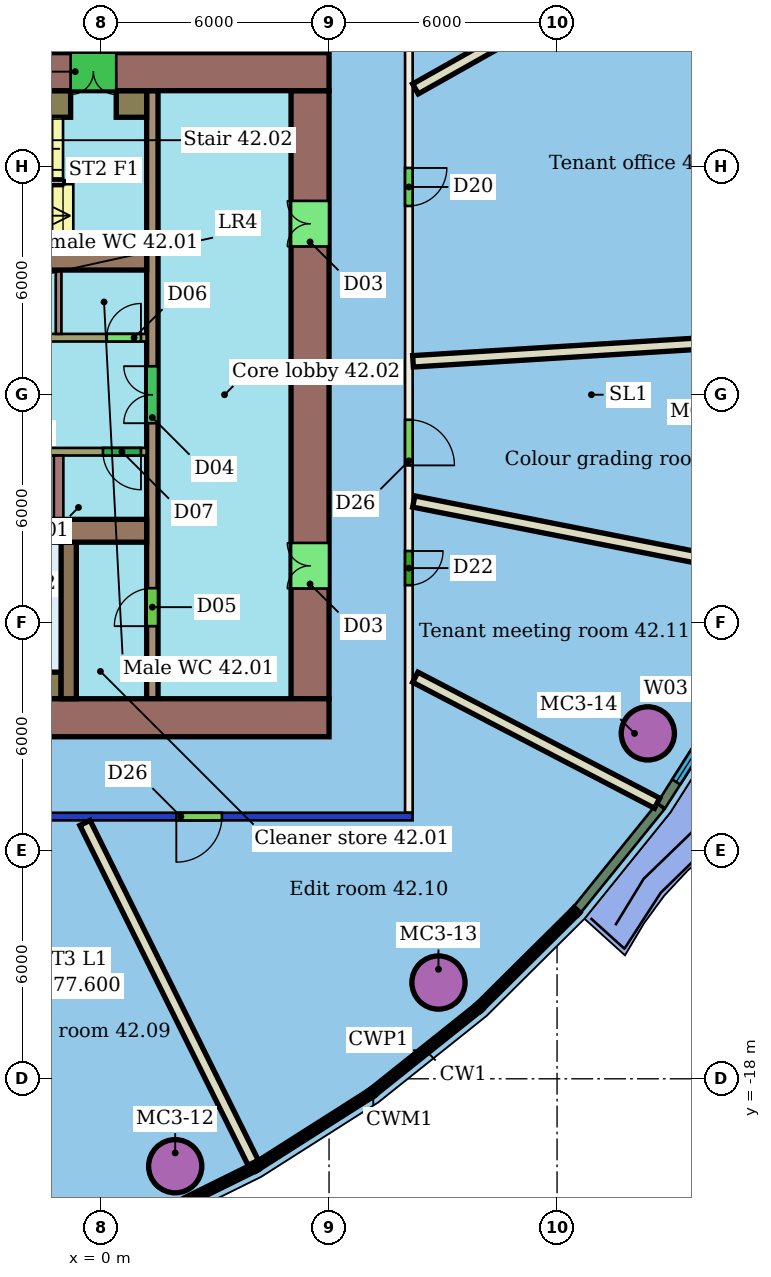
"""IFC4 building model, lengths in metres.
Left out: names, types, materials, properties, quantities, classifications, styles, units other than length and angle.
Written with IfcOpenShell. Run it as: python <this file> out.ifc"""

import sys

from ifc_helpers import new_model, si_unit, direction, frame, frame_2d, origin, origin_2d, place, context, subcontext, project, spatial, rectangle, hollow_circle, extrude, element, fill, save


model = new_model("IFC4")
c1 = context("Model", 3, precision=1e-05, world=origin(), true_north=direction((0.0, 1.0)))
c2 = subcontext(c1, "Body", "Model", "MODEL_VIEW")
j1 = project(units=[si_unit("LENGTHUNIT", "METRE"), si_unit("PLANEANGLEUNIT", "RADIAN")], contexts=[c1])
p1 = place(None, origin())
s1 = spatial("IfcSite", under=j1, at=p1, CompositionType="ELEMENT")
p2 = place(p1, origin())
s2 = spatial("IfcBuilding", under=s1, at=p2, CompositionType="ELEMENT")
p3 = place(p2, frame((0.0, 0.0, 175.8)))
s3 = spatial("IfcBuildingStorey", under=s2, at=p3, CompositionType="ELEMENT", Elevation=175.8)
for number, where, z_axis, x_axis in (
    (1, (1.952, -20.301, 0.0), (0.0, 0.0, 1.0), (1.0, 0.0, 0.0)),
    (2, (8.879, -15.467, 0.0), (0.0, 0.0, 1.0), (1.0, 0.0, 0.0)),
    (3, (14.388, -8.912, 0.0), (0.0, 0.0, 1.0), (1.0, 0.0, 0.0)),
):
    element("IfcColumn", number, at=place(p3, frame(where, z_axis=z_axis, x_axis=x_axis)), inside=s3, PredefinedType="COLUMN", context=c2, shape_type="SweptSolid", body=[
        extrude(hollow_circle(Radius=0.7, WallThickness=0.05, at=origin_2d()), origin(), (0.0, 0.0, 1.0), 3.4),
    ])
p4 = place(p3, frame((8.2, -11.1, 0.0), z_axis=(0.0, 0.0, 1.0), x_axis=(-1.0, 0.0, 0.0)))
e4 = element("IfcWall", 4, at=p4, inside=s3, PredefinedType="PARTITIONING", context=c2, shape_type="SweptSolid", body=[
    extrude(rectangle(XDim=28.4, YDim=0.2, at=frame_2d((14.2, 0.0))), origin(), (0.0, 0.0, 1.0), 3.0),
])
p5 = place(p4, frame((22.523, 0.0, 0.0)))
e5 = element("IfcOpeningElement", 5, at=p5, cuts=e4, PredefinedType="OPENING", context=c2, shape_type="SweptSolid", body=[
    extrude(rectangle(XDim=1.8, YDim=2.1, at=frame_2d((0.9, 1.05))), frame((0.0, 0.11, 0.0), z_axis=(0.0, -1.0, 0.0), x_axis=(1.0, 0.0, 0.0)), (0.0, 0.0, 1.0), 0.22),
])
p6 = place(p4, frame((18.485, 0.0, 0.0)))
e6 = element("IfcOpeningElement", 6, at=p6, cuts=e4, PredefinedType="OPENING", context=c2, shape_type="SweptSolid", body=[
    extrude(rectangle(XDim=1.2, YDim=2.1, at=frame_2d((0.6, 1.05))), frame((0.0, 0.11, 0.0), z_axis=(0.0, -1.0, 0.0), x_axis=(1.0, 0.0, 0.0)), (0.0, 0.0, 1.0), 0.22),
])
p7 = place(p4, frame((14.945, 0.0, 0.0)))
e7 = element("IfcOpeningElement", 7, at=p7, cuts=e4, PredefinedType="OPENING", context=c2, shape_type="SweptSolid", body=[
    extrude(rectangle(XDim=1.0, YDim=2.1, at=frame_2d((0.5, 1.05))), frame((0.0, 0.11, 0.0), z_axis=(0.0, -1.0, 0.0), x_axis=(1.0, 0.0, 0.0)), (0.0, 0.0, 1.0), 0.22),
])
p8 = place(p4, frame((9.653, 0.0, 0.0)))
e8 = element("IfcOpeningElement", 8, at=p8, cuts=e4, PredefinedType="OPENING", context=c2, shape_type="SweptSolid", body=[
    extrude(rectangle(XDim=1.2, YDim=2.1, at=frame_2d((0.6, 1.05))), frame((0.0, 0.11, 0.0), z_axis=(0.0, -1.0, 0.0), x_axis=(1.0, 0.0, 0.0)), (0.0, 0.0, 1.0), 0.22),
])
p9 = place(p4, frame((5.019, 0.0, 0.0)))
e9 = element("IfcOpeningElement", 9, at=p9, cuts=e4, PredefinedType="OPENING", context=c2, shape_type="SweptSolid", body=[
    extrude(rectangle(XDim=1.2, YDim=2.1, at=frame_2d((0.6, 1.05))), frame((0.0, 0.11, 0.0), z_axis=(0.0, -1.0, 0.0), x_axis=(1.0, 0.0, 0.0)), (0.0, 0.0, 1.0), 0.22),
])
p10 = place(p3, frame((8.1, 11.0, 0.0), z_axis=(0.0, 0.0, 1.0), x_axis=(0.0, -1.0, 0.0)))
e10 = element("IfcWall", 10, at=p10, inside=s3, PredefinedType="PARTITIONING", context=c2, shape_type="SweptSolid", body=[
    extrude(rectangle(XDim=22.0, YDim=0.2, at=frame_2d((11.0, 0.0))), origin(), (0.0, 0.0, 1.0), 3.4),
])
p11 = place(p10, frame((15.112, 0.0, 0.0)))
e11 = element("IfcOpeningElement", 11, at=p11, cuts=e10, PredefinedType="OPENING", context=c2, shape_type="SweptSolid", body=[
    extrude(rectangle(XDim=0.9, YDim=2.1, at=frame_2d((0.45, 1.05))), frame((0.0, 0.11, 0.0), z_axis=(0.0, -1.0, 0.0), x_axis=(1.0, 0.0, 0.0)), (0.0, 0.0, 1.0), 0.22),
])
p12 = place(p10, frame((11.66, 0.0, 0.0)))
e12 = element("IfcOpeningElement", 12, at=p12, cuts=e10, PredefinedType="OPENING", context=c2, shape_type="SweptSolid", body=[
    extrude(rectangle(XDim=1.2, YDim=2.1, at=frame_2d((0.6, 1.05))), frame((0.0, 0.11, 0.0), z_axis=(0.0, -1.0, 0.0), x_axis=(1.0, 0.0, 0.0)), (0.0, 0.0, 1.0), 0.22),
])
p13 = place(p10, frame((5.034, 0.0, 0.0)))
e13 = element("IfcOpeningElement", 13, at=p13, cuts=e10, PredefinedType="OPENING", context=c2, shape_type="SweptSolid", body=[
    extrude(rectangle(XDim=1.0, YDim=2.1, at=frame_2d((0.5, 1.05))), frame((0.0, 0.11, 0.0), z_axis=(0.0, -1.0, 0.0), x_axis=(1.0, 0.0, 0.0)), (0.0, 0.0, 1.0), 0.22),
])
p14 = place(p3, frame((4.004, -20.209, 0.0), z_axis=(0.0, 0.0, 1.0), x_axis=(-0.443647752569, 0.896201245056, 0.0)))
e14 = element("IfcWall", 14, at=p14, inside=s3, PredefinedType="PARTITIONING", context=c2, shape_type="SweptSolid", body=[
    extrude(rectangle(XDim=9.979, YDim=0.3, at=frame_2d((4.989, 0.0))), origin(), (0.0, 0.0, 1.0), 3.4),
])
p15 = place(p3, frame((14.632, -10.749, 0.0), z_axis=(0.0, 0.0, 1.0), x_axis=(-0.886864995103, 0.462028657618, 0.0)))
e15 = element("IfcWall", 15, at=p15, inside=s3, PredefinedType="PARTITIONING", context=c2, shape_type="SweptSolid", body=[
    extrude(rectangle(XDim=7.175, YDim=0.3, at=frame_2d((3.587, 0.0))), origin(), (0.0, 0.0, 1.0), 3.4),
])
p16 = place(p3, frame((17.987, -4.737, 0.0), z_axis=(0.0, 0.0, 1.0), x_axis=(-0.981048005171, 0.193764835689, 0.0)))
e16 = element("IfcWall", 16, at=p16, inside=s3, PredefinedType="PARTITIONING", context=c2, shape_type="SweptSolid", body=[
    extrude(rectangle(XDim=9.946, YDim=0.3, at=frame_2d((4.973, 0.0))), origin(), (0.0, 0.0, 1.0), 3.4),
])
p17 = place(p3, frame((19.7, 1.589, 0.0), z_axis=(0.0, 0.0, 1.0), x_axis=(-0.998092720138, -0.061732665639, 0.0)))
e17 = element("IfcWall", 17, at=p17, inside=s3, PredefinedType="PARTITIONING", context=c2, shape_type="SweptSolid", body=[
    extrude(rectangle(XDim=11.512, YDim=0.3, at=frame_2d((5.756, 0.0))), origin(), (0.0, 0.0, 1.0), 3.4),
])
p18 = place(p3, frame((17.885, 13.463, 0.0), z_axis=(0.0, 0.0, 1.0), x_axis=(-0.871144981066, -0.491025887265, 0.0)))
e18 = element("IfcWall", 18, at=p18, inside=s3, PredefinedType="PARTITIONING", context=c2, shape_type="SweptSolid", body=[
    extrude(rectangle(XDim=11.033, YDim=0.3, at=frame_2d((5.517, 0.0))), origin(), (0.0, 0.0, 1.0), 3.4),
])
p19 = place(p3, frame((12.533, -13.545, 0.0), z_axis=(0.0, 0.0, 1.0), x_axis=(0.628441308027, 0.777857006374, 0.0)))
e19 = element("IfcWall", 19, at=p19, inside=s3, PredefinedType="SOLIDWALL", context=c2, shape_type="SweptSolid", body=[
    extrude(rectangle(XDim=3.49, YDim=0.25, at=frame_2d((1.745, 0.0))), origin(), (0.0, 0.0, 1.0), 3.05),
])
p20 = place(p3, frame((14.74, -10.812, 0.0), z_axis=(0.0, 0.0, 1.0), x_axis=(0.53695729442, 0.843609426197, 0.0)))
e20 = element("IfcWall", 20, at=p20, inside=s3, PredefinedType="SOLIDWALL", context=c2, shape_type="SweptSolid", body=[
    extrude(rectangle(XDim=3.476, YDim=0.25, at=frame_2d((1.738, 0.0))), origin(), (0.0, 0.0, 1.0), 3.05),
])
p21 = place(p20, frame((0.738, 0.0, 0.9)))
e21 = element("IfcOpeningElement", 21, at=p21, cuts=e20, PredefinedType="OPENING", context=c2, shape_type="SweptSolid", body=[
    extrude(rectangle(XDim=2.0, YDim=2.1, at=frame_2d((1.0, 1.05))), frame((0.0, 0.135, 0.0), z_axis=(0.0, -1.0, 0.0), x_axis=(1.0, 0.0, 0.0)), (0.0, 0.0, 1.0), 0.27),
])
p22 = place(p3, frame((6.0, 8.5, 0.0), z_axis=(0.0, 0.0, 1.0), x_axis=(-1.0, 0.0, 0.0)))
e22 = element("IfcWall", 22, at=p22, inside=s3, PredefinedType="SHEAR", context=c2, shape_type="SweptSolid", body=[
    extrude(rectangle(XDim=12.0, YDim=1.0, at=frame_2d((6.0, 0.0))), origin(), (0.0, 0.0, 1.0), 3.3),
])
p23 = place(p22, frame((5.6, 0.0, 0.0)))
e23 = element("IfcOpeningElement", 23, at=p23, cuts=e22, PredefinedType="OPENING", context=c2, shape_type="SweptSolid", body=[
    extrude(rectangle(XDim=1.2, YDim=2.1, at=frame_2d((0.6, 1.05))), frame((0.0, 0.51, 0.0), z_axis=(0.0, -1.0, 0.0), x_axis=(1.0, 0.0, 0.0)), (0.0, 0.0, 1.0), 1.02),
])
p24 = place(p3, frame((-18.0, -8.5, 0.0), z_axis=(0.0, 0.0, 1.0), x_axis=(1.0, 0.0, 0.0)))
e24 = element("IfcWall", 24, at=p24, inside=s3, PredefinedType="SHEAR", context=c2, shape_type="SweptSolid", body=[
    extrude(rectangle(XDim=24.0, YDim=1.0, at=frame_2d((12.0, 0.0))), origin(), (0.0, 0.0, 1.0), 3.3),
])
p25 = place(p24, frame((6.0, 0.0, 0.0)))
e25 = element("IfcOpeningElement", 25, at=p25, cuts=e24, PredefinedType="OPENING", context=c2, shape_type="SweptSolid", body=[
    extrude(rectangle(XDim=1.2, YDim=2.1, at=frame_2d((0.6, 1.05))), frame((0.0, 0.51, 0.0), z_axis=(0.0, -1.0, 0.0), x_axis=(1.0, 0.0, 0.0)), (0.0, 0.0, 1.0), 1.02),
])
p26 = place(p3, frame((5.5, -8.0, 0.0), z_axis=(0.0, 0.0, 1.0), x_axis=(0.0, 1.0, 0.0)))
e26 = element("IfcWall", 26, at=p26, inside=s3, PredefinedType="SHEAR", context=c2, shape_type="SweptSolid", body=[
    extrude(rectangle(XDim=16.0, YDim=1.0, at=frame_2d((8.0, 0.0))), origin(), (0.0, 0.0, 1.0), 3.3),
])
p27 = place(p26, frame((2.9, 0.0, 0.0)))
e27 = element("IfcOpeningElement", 27, at=p27, cuts=e26, PredefinedType="OPENING", context=c2, shape_type="SweptSolid", body=[
    extrude(rectangle(XDim=1.2, YDim=2.1, at=frame_2d((0.6, 1.05))), frame((0.0, 0.51, 0.0), z_axis=(0.0, -1.0, 0.0), x_axis=(1.0, 0.0, 0.0)), (0.0, 0.0, 1.0), 1.02),
])
p28 = place(p26, frame((11.9, 0.0, 0.0)))
e28 = element("IfcOpeningElement", 28, at=p28, cuts=e26, PredefinedType="OPENING", context=c2, shape_type="SweptSolid", body=[
    extrude(rectangle(XDim=1.2, YDim=2.1, at=frame_2d((0.6, 1.05))), frame((0.0, 0.51, 0.0), z_axis=(0.0, -1.0, 0.0), x_axis=(1.0, 0.0, 0.0)), (0.0, 0.0, 1.0), 1.02),
])
for number, where, z_axis, x_axis in (
    (29, (-6.0, 3.58, 0.0), (0.0, 0.0, 1.0), (1.0, 0.0, 0.0)),
    (30, (-6.0, -3.58, 0.0), (0.0, 0.0, 1.0), (1.0, 0.0, 0.0)),
):
    element("IfcWall", number, at=place(p3, frame(where, z_axis=z_axis, x_axis=x_axis)), inside=s3, PredefinedType="SHEAR", context=c2, shape_type="SweptSolid", body=[
        extrude(rectangle(XDim=7.2, YDim=0.6, at=frame_2d((3.6, 0.0))), origin(), (0.0, 0.0, 1.0), 3.3),
    ])
p29 = place(p3, frame((1.35, -8.0, 0.0), z_axis=(0.0, 0.0, 1.0), x_axis=(0.0, 1.0, 0.0)))
e31 = element("IfcWall", 31, at=p29, inside=s3, PredefinedType="SHEAR", context=c2, shape_type="SweptSolid", body=[
    extrude(rectangle(XDim=16.0, YDim=0.3, at=frame_2d((8.0, 0.0))), origin(), (0.0, 0.0, 1.0), 3.3),
])
p30 = place(p29, frame((1.91, 0.0, 0.0)))
e32 = element("IfcOpeningElement", 32, at=p30, cuts=e31, PredefinedType="OPENING", context=c2, shape_type="SweptSolid", body=[
    extrude(rectangle(XDim=1.0, YDim=2.1, at=frame_2d((0.5, 1.05))), frame((0.0, 0.16, 0.0), z_axis=(0.0, -1.0, 0.0), x_axis=(1.0, 0.0, 0.0)), (0.0, 0.0, 1.0), 0.32),
])
p31 = place(p29, frame((7.25, 0.0, 0.0)))
e33 = element("IfcOpeningElement", 33, at=p31, cuts=e31, PredefinedType="OPENING", context=c2, shape_type="SweptSolid", body=[
    extrude(rectangle(XDim=1.5, YDim=2.1, at=frame_2d((0.75, 1.05))), frame((0.0, 0.16, 0.0), z_axis=(0.0, -1.0, 0.0), x_axis=(1.0, 0.0, 0.0)), (0.0, 0.0, 1.0), 0.32),
])
p32 = place(p3, frame((-13.2, 1.5, 0.0), z_axis=(0.0, 0.0, 1.0), x_axis=(1.0, 0.0, 0.0)))
e34 = element("IfcWall", 34, at=p32, inside=s3, PredefinedType="SHEAR", context=c2, shape_type="SweptSolid", body=[
    extrude(rectangle(XDim=14.4, YDim=0.2, at=frame_2d((7.2, 0.0))), origin(), (0.0, 0.0, 1.0), 3.3),
])
p33 = place(p32, frame((0.546, 0.0, 0.0)))
e35 = element("IfcOpeningElement", 35, at=p33, cuts=e34, PredefinedType="OPENING", context=c2, shape_type="SweptSolid", body=[
    extrude(rectangle(XDim=1.1, YDim=2.1, at=frame_2d((0.55, 1.05))), frame((0.0, 0.11, 0.0), z_axis=(0.0, -1.0, 0.0), x_axis=(1.0, 0.0, 0.0)), (0.0, 0.0, 1.0), 0.22),
])
p34 = place(p32, frame((2.988, 0.0, 0.0)))
e36 = element("IfcOpeningElement", 36, at=p34, cuts=e34, PredefinedType="OPENING", context=c2, shape_type="SweptSolid", body=[
    extrude(rectangle(XDim=1.1, YDim=2.1, at=frame_2d((0.55, 1.05))), frame((0.0, 0.11, 0.0), z_axis=(0.0, -1.0, 0.0), x_axis=(1.0, 0.0, 0.0)), (0.0, 0.0, 1.0), 0.22),
])
p35 = place(p32, frame((5.429, 0.0, 0.0)))
e37 = element("IfcOpeningElement", 37, at=p35, cuts=e34, PredefinedType="OPENING", context=c2, shape_type="SweptSolid", body=[
    extrude(rectangle(XDim=1.1, YDim=2.1, at=frame_2d((0.55, 1.05))), frame((0.0, 0.11, 0.0), z_axis=(0.0, -1.0, 0.0), x_axis=(1.0, 0.0, 0.0)), (0.0, 0.0, 1.0), 0.22),
])
p36 = place(p32, frame((7.871, 0.0, 0.0)))
e38 = element("IfcOpeningElement", 38, at=p36, cuts=e34, PredefinedType="OPENING", context=c2, shape_type="SweptSolid", body=[
    extrude(rectangle(XDim=1.1, YDim=2.1, at=frame_2d((0.55, 1.05))), frame((0.0, 0.11, 0.0), z_axis=(0.0, -1.0, 0.0), x_axis=(1.0, 0.0, 0.0)), (0.0, 0.0, 1.0), 0.22),
])
p37 = place(p32, frame((10.958, 0.0, 0.0)))
e39 = element("IfcOpeningElement", 39, at=p37, cuts=e34, PredefinedType="OPENING", context=c2, shape_type="SweptSolid", body=[
    extrude(rectangle(XDim=0.9, YDim=2.1, at=frame_2d((0.45, 1.05))), frame((0.0, 0.11, 0.0), z_axis=(0.0, -1.0, 0.0), x_axis=(1.0, 0.0, 0.0)), (0.0, 0.0, 1.0), 0.22),
])
p38 = place(p32, frame((13.35, 0.0, 0.0)))
e40 = element("IfcOpeningElement", 40, at=p38, cuts=e34, PredefinedType="OPENING", context=c2, shape_type="SweptSolid", body=[
    extrude(rectangle(XDim=0.9, YDim=2.1, at=frame_2d((0.45, 1.05))), frame((0.0, 0.11, 0.0), z_axis=(0.0, -1.0, 0.0), x_axis=(1.0, 0.0, 0.0)), (0.0, 0.0, 1.0), 0.22),
])
p39 = place(p3, frame((1.2, -1.5, 0.0), z_axis=(0.0, 0.0, 1.0), x_axis=(-1.0, 0.0, 0.0)))
e41 = element("IfcWall", 41, at=p39, inside=s3, PredefinedType="SHEAR", context=c2, shape_type="SweptSolid", body=[
    extrude(rectangle(XDim=14.4, YDim=0.2, at=frame_2d((7.2, 0.0))), origin(), (0.0, 0.0, 1.0), 3.3),
])
p40 = place(p39, frame((7.821, 0.0, 0.0)))
e42 = element("IfcOpeningElement", 42, at=p40, cuts=e41, PredefinedType="OPENING", context=c2, shape_type="SweptSolid", body=[
    extrude(rectangle(XDim=1.2, YDim=2.1, at=frame_2d((0.6, 1.05))), frame((0.0, 0.11, 0.0), z_axis=(0.0, -1.0, 0.0), x_axis=(1.0, 0.0, 0.0)), (0.0, 0.0, 1.0), 0.22),
])
p41 = place(p39, frame((0.15, 0.0, 0.0)))
e43 = element("IfcOpeningElement", 43, at=p41, cuts=e41, PredefinedType="OPENING", context=c2, shape_type="SweptSolid", body=[
    extrude(rectangle(XDim=1.0, YDim=2.1, at=frame_2d((0.5, 1.05))), frame((0.0, 0.11, 0.0), z_axis=(0.0, -1.0, 0.0), x_axis=(1.0, 0.0, 0.0)), (0.0, 0.0, 1.0), 0.22),
])
p42 = place(p3, frame((-0.85, -3.88, 0.0), z_axis=(0.0, 0.0, 1.0), x_axis=(0.0, -1.0, 0.0)))
e44 = element("IfcWall", 44, at=p42, inside=s3, PredefinedType="SHEAR", context=c2, shape_type="SweptSolid", body=[
    extrude(rectangle(XDim=4.12, YDim=0.4, at=frame_2d((2.06, 0.0))), origin(), (0.0, 0.0, 1.0), 3.3),
])
p43 = place(p3, frame((-5.85, 7.65, 0.0), z_axis=(0.0, 0.0, 1.0), x_axis=(1.0, 0.0, 0.0)))
e45 = element("IfcWall", 45, at=p43, inside=s3, PredefinedType="SHEAR", context=c2, shape_type="SweptSolid", body=[
    extrude(rectangle(XDim=5.05, YDim=0.7, at=frame_2d((2.525, 0.0))), origin(), (0.0, 0.0, 1.0), 3.3),
])
p44 = place(p3, frame((0.4, 7.65, 0.0), z_axis=(0.0, 0.0, 1.0), x_axis=(1.0, 0.0, 0.0)))
e46 = element("IfcWall", 46, at=p44, inside=s3, PredefinedType="SHEAR", context=c2, shape_type="SweptSolid", body=[
    extrude(rectangle(XDim=0.8, YDim=0.7, at=frame_2d((0.4, 0.0))), origin(), (0.0, 0.0, 1.0), 3.3),
])
p45 = place(p3, frame((-8.1, -7.65, 0.0), z_axis=(0.0, 0.0, 1.0), x_axis=(1.0, 0.0, 0.0)))
e47 = element("IfcWall", 47, at=p45, inside=s3, PredefinedType="SHEAR", context=c2, shape_type="SweptSolid", body=[
    extrude(rectangle(XDim=7.05, YDim=0.7, at=frame_2d((3.525, 0.0))), origin(), (0.0, 0.0, 1.0), 3.3),
])
p46 = place(p3, frame((-1.117, 1.6, 0.0), z_axis=(0.0, 0.0, 1.0), x_axis=(0.0, 1.0, 0.0)))
e48 = element("IfcWall", 48, at=p46, inside=s3, PredefinedType="PARTITIONING", context=c2, shape_type="SweptSolid", body=[
    extrude(rectangle(XDim=1.68, YDim=0.15, at=frame_2d((0.84, 0.0))), origin(), (0.0, 0.0, 1.0), 3.3),
])
p47 = place(p3, frame((-1.117, -1.6, 0.0), z_axis=(0.0, 0.0, 1.0), x_axis=(0.0, -1.0, 0.0)))
e49 = element("IfcWall", 49, at=p47, inside=s3, PredefinedType="SHEAR", context=c2, shape_type="SweptSolid", body=[
    extrude(rectangle(XDim=1.68, YDim=0.25, at=frame_2d((0.84, 0.0))), origin(), (0.0, 0.0, 1.0), 3.3),
])
p48 = place(p9, origin())
e50 = element("IfcDoor", 50, at=p48, inside=s3, OperationType="SINGLE_SWING_RIGHT", PredefinedType="DOOR", context=c2, shape_type="SweptSolid", body=[
    extrude(rectangle(XDim=1.2, YDim=2.1, at=frame_2d((0.6, 1.05))), frame((0.0, 0.025, 0.0), z_axis=(0.0, -1.0, 0.0), x_axis=(1.0, 0.0, 0.0)), (0.0, 0.0, 1.0), 0.05),
])
fill(e9, e50)
p49 = place(p11, origin())
e51 = element("IfcDoor", 51, at=p49, inside=s3, OperationType="SINGLE_SWING_LEFT", PredefinedType="DOOR", context=c2, shape_type="SweptSolid", body=[
    extrude(rectangle(XDim=0.9, YDim=2.1, at=frame_2d((0.45, 1.05))), frame((0.0, 0.025, 0.0), z_axis=(0.0, -1.0, 0.0), x_axis=(1.0, 0.0, 0.0)), (0.0, 0.0, 1.0), 0.05),
])
fill(e11, e51)
p50 = place(p12, origin())
e52 = element("IfcDoor", 52, at=p50, inside=s3, OperationType="SINGLE_SWING_RIGHT", PredefinedType="DOOR", context=c2, shape_type="SweptSolid", body=[
    extrude(rectangle(XDim=1.2, YDim=2.1, at=frame_2d((0.6, 1.05))), frame((0.0, 0.025, 0.0), z_axis=(0.0, -1.0, 0.0), x_axis=(1.0, 0.0, 0.0)), (0.0, 0.0, 1.0), 0.05),
])
fill(e12, e52)
p51 = place(p13, origin())
e53 = element("IfcDoor", 53, at=p51, inside=s3, OperationType="SINGLE_SWING_LEFT", PredefinedType="DOOR", context=c2, shape_type="SweptSolid", body=[
    extrude(rectangle(XDim=1.0, YDim=2.1, at=frame_2d((0.5, 1.05))), frame((0.0, 0.025, 0.0), z_axis=(0.0, -1.0, 0.0), x_axis=(1.0, 0.0, 0.0)), (0.0, 0.0, 1.0), 0.05),
])
fill(e13, e53)
p52 = place(p21, origin())
e54 = element("IfcWindow", 54, at=p52, inside=s3, PartitioningType="SINGLE_PANEL", PredefinedType="WINDOW", context=c2, shape_type="SweptSolid", body=[
    extrude(rectangle(XDim=2.0, YDim=2.1, at=frame_2d((1.0, 1.05))), frame((0.0, 0.03, 0.0), z_axis=(0.0, -1.0, 0.0), x_axis=(1.0, 0.0, 0.0)), (0.0, 0.0, 1.0), 0.06),
])
fill(e21, e54)
p53 = place(p23, origin())
e55 = element("IfcDoor", 55, at=p53, inside=s3, OperationType="DOUBLE_DOOR_SINGLE_SWING", PredefinedType="NOTDEFINED", context=c2, shape_type="SweptSolid", body=[
    extrude(rectangle(XDim=1.2, YDim=2.1, at=frame_2d((0.6, 1.05))), frame((0.0, 0.025, 0.0), z_axis=(0.0, -1.0, 0.0), x_axis=(1.0, 0.0, 0.0)), (0.0, 0.0, 1.0), 0.05),
])
fill(e23, e55)
p54 = place(p27, origin())
e56 = element("IfcDoor", 56, at=p54, inside=s3, OperationType="DOUBLE_DOOR_SINGLE_SWING", PredefinedType="NOTDEFINED", context=c2, shape_type="SweptSolid", body=[
    extrude(rectangle(XDim=1.2, YDim=2.1, at=frame_2d((0.6, 1.05))), frame((0.0, 0.025, 0.0), z_axis=(0.0, -1.0, 0.0), x_axis=(1.0, 0.0, 0.0)), (0.0, 0.0, 1.0), 0.05),
])
fill(e27, e56)
p55 = place(p28, origin())
e57 = element("IfcDoor", 57, at=p55, inside=s3, OperationType="DOUBLE_DOOR_SINGLE_SWING", PredefinedType="NOTDEFINED", context=c2, shape_type="SweptSolid", body=[
    extrude(rectangle(XDim=1.2, YDim=2.1, at=frame_2d((0.6, 1.05))), frame((0.0, 0.025, 0.0), z_axis=(0.0, -1.0, 0.0), x_axis=(1.0, 0.0, 0.0)), (0.0, 0.0, 1.0), 0.05),
])
fill(e28, e57)
p56 = place(p30, origin())
e58 = element("IfcDoor", 58, at=p56, inside=s3, OperationType="SINGLE_SWING_LEFT", PredefinedType="NOTDEFINED", context=c2, shape_type="SweptSolid", body=[
    extrude(rectangle(XDim=1.0, YDim=2.1, at=frame_2d((0.5, 1.05))), frame((0.0, 0.025, 0.0), z_axis=(0.0, -1.0, 0.0), x_axis=(1.0, 0.0, 0.0)), (0.0, 0.0, 1.0), 0.05),
])
fill(e32, e58)
p57 = place(p31, origin())
e59 = element("IfcDoor", 59, at=p57, inside=s3, OperationType="DOUBLE_DOOR_SINGLE_SWING", PredefinedType="NOTDEFINED", context=c2, shape_type="SweptSolid", body=[
    extrude(rectangle(XDim=1.5, YDim=2.1, at=frame_2d((0.75, 1.05))), frame((0.0, 0.025, 0.0), z_axis=(0.0, -1.0, 0.0), x_axis=(1.0, 0.0, 0.0)), (0.0, 0.0, 1.0), 0.05),
])
fill(e33, e59)
p58 = place(p38, origin())
e60 = element("IfcDoor", 60, at=p58, inside=s3, OperationType="SINGLE_SWING_RIGHT", PredefinedType="NOTDEFINED", context=c2, shape_type="SweptSolid", body=[
    extrude(rectangle(XDim=0.9, YDim=2.1, at=frame_2d((0.45, 1.05))), frame((0.0, 0.025, 0.0), z_axis=(0.0, -1.0, 0.0), x_axis=(1.0, 0.0, 0.0)), (0.0, 0.0, 1.0), 0.05),
])
fill(e40, e60)
p59 = place(p41, origin())
e61 = element("IfcDoor", 61, at=p59, inside=s3, OperationType="SINGLE_SWING_LEFT", PredefinedType="NOTDEFINED", context=c2, shape_type="SweptSolid", body=[
    extrude(rectangle(XDim=1.0, YDim=2.1, at=frame_2d((0.5, 1.05))), frame((0.0, 0.025, 0.0), z_axis=(0.0, -1.0, 0.0), x_axis=(1.0, 0.0, 0.0)), (0.0, 0.0, 1.0), 0.05),
])
fill(e43, e61)
save(model, sys.argv[1])
